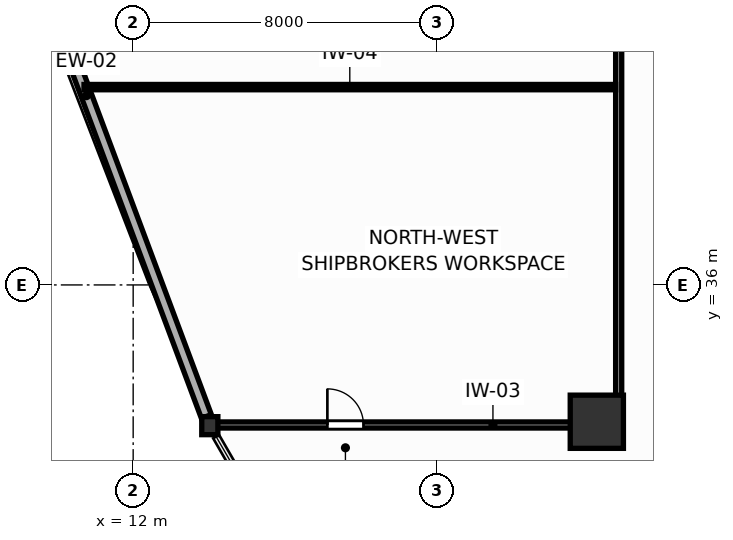
"""IFC4 building model, lengths in metres.
Left out: names, types, materials, properties, quantities, classifications, styles, units other than length and angle.
Written with IfcOpenShell. Run it as: python <this file> out.ifc"""

import sys

from ifc_helpers import new_model, si_unit, direction, frame, frame_2d, origin, origin_2d, place, context, subcontext, project, spatial, rectangle, i_section, extrude, source, transform, mapped, element, fill, save


model = new_model("IFC4")
c1 = context("Model", 3, precision=1e-05, world=origin(), true_north=direction((0.0, 1.0)))
c2 = subcontext(c1, "Body", "Model", "MODEL_VIEW")
j1 = project(units=[si_unit("LENGTHUNIT", "METRE"), si_unit("PLANEANGLEUNIT", "RADIAN")], contexts=[c1])
p1 = place(None, origin())
s1 = spatial("IfcSite", under=j1, at=p1, CompositionType="ELEMENT")
p2 = place(p1, origin())
s2 = spatial("IfcBuilding", under=s1, at=p2, CompositionType="ELEMENT")
p3 = place(p2, frame((0.0, 0.0, 51.3)))
s3 = spatial("IfcBuildingStorey", under=s2, at=p3, CompositionType="ELEMENT", Elevation=51.3)
m1 = source(origin(), c2, "Body", "SweptSolid", [
    extrude(rectangle(XDim=1.4, YDim=1.4, at=origin_2d()), origin(), (0.0, 0.0, 1.0), 3.9),
])
p4 = place(p3, frame((24.2, 32.4, 0.0), z_axis=(0.0, 0.0, 1.0), x_axis=(1.0, 0.0, 0.0)))
e1 = element("IfcColumn", 1, at=p4, inside=s3, PredefinedType="COLUMN", context=c2, shape_type="MappedRepresentation", body=[
    mapped(m1, transform((0.0, 0.0, 0.0), scale=1.0)),
])
m2 = source(origin(), c2, "Body", "SweptSolid", [
    extrude(i_section(OverallWidth=0.424, OverallDepth=0.474, WebThickness=0.045, FlangeThickness=0.072, FilletRadius=0.015, at=origin_2d()), origin(), (0.0, 0.0, 1.0), 3.9),
])
p5 = place(p3, frame((14.017, 32.297, 0.0), z_axis=(0.0, 0.0, 1.0), x_axis=(1.0, 0.0, 0.0)))
e2 = element("IfcColumn", 2, at=p5, inside=s3, PredefinedType="COLUMN", context=c2, shape_type="MappedRepresentation", body=[
    mapped(m2, transform((0.0, 0.0, 0.0), scale=1.0)),
])
p6 = place(p3, frame((7.616, 49.42, 0.0), z_axis=(0.0, 0.0, 1.0), x_axis=(0.350140465982, -0.936697205121, 0.0)))
e3 = element("IfcWall", 3, at=p6, inside=s3, PredefinedType="SOLIDWALL", context=c2, shape_type="SweptSolid", body=[
    extrude(rectangle(XDim=18.022, YDim=0.28, at=frame_2d((9.011, 0.0))), origin(), (0.0, 0.0, 1.0), 3.23),
])
p7 = place(p3, frame((24.775, 32.31, 0.0), z_axis=(0.0, 0.0, 1.0), x_axis=(0.0, 1.0, 0.0)))
e4 = element("IfcWall", 4, at=p7, inside=s3, PredefinedType="PARTITIONING", context=c2, shape_type="SweptSolid", body=[
    extrude(rectangle(XDim=23.984, YDim=0.16, at=frame_2d((11.992, 0.0))), origin(), (0.0, 0.0, 1.0), 3.68),
])
p8 = place(p7, frame((11.477, 0.0, 0.0)))
e5 = element("IfcOpeningElement", 5, at=p8, cuts=e4, PredefinedType="OPENING", context=c2, shape_type="SweptSolid", body=[
    extrude(rectangle(XDim=0.95, YDim=2.05, at=frame_2d((0.475, 1.025))), frame((0.0, 0.09, 0.0), z_axis=(0.0, -1.0, 0.0), x_axis=(1.0, 0.0, 0.0)), (0.0, 0.0, 1.0), 0.18),
])
p9 = place(p3, frame((14.03, 32.315, 0.0), z_axis=(0.0, 0.0, 1.0), x_axis=(1.0, 0.0, 0.0)))
e6 = element("IfcWall", 6, at=p9, inside=s3, PredefinedType="PARTITIONING", context=c2, shape_type="SweptSolid", body=[
    extrude(rectangle(XDim=10.663, YDim=0.16, at=frame_2d((5.332, 0.0))), origin(), (0.0, 0.0, 1.0), 3.18),
])
p10 = place(p9, frame((3.08, 0.0, 0.0)))
e7 = element("IfcOpeningElement", 7, at=p10, cuts=e6, PredefinedType="OPENING", context=c2, shape_type="SweptSolid", body=[
    extrude(rectangle(XDim=0.95, YDim=2.05, at=frame_2d((0.475, 1.025))), frame((0.0, 0.09, 0.0), z_axis=(0.0, -1.0, 0.0), x_axis=(1.0, 0.0, 0.0)), (0.0, 0.0, 1.0), 0.18),
])
p11 = place(p3, frame((10.707, 41.205, 0.0), z_axis=(0.0, 0.0, 1.0), x_axis=(1.0, 0.0, 0.0)))
e8 = element("IfcWall", 8, at=p11, inside=s3, PredefinedType="PARTITIONING", context=c2, shape_type="SweptSolid", body=[
    extrude(rectangle(XDim=13.986, YDim=0.14, at=frame_2d((6.993, 0.0))), origin(), (0.0, 0.0, 1.0), 3.68),
])
p12 = place(p10, origin())
e9 = element("IfcDoor", 9, at=p12, inside=s3, OperationType="SINGLE_SWING_LEFT", PredefinedType="DOOR", context=c2, shape_type="SweptSolid", body=[
    extrude(rectangle(XDim=0.95, YDim=2.05, at=frame_2d((0.475, 1.025))), frame((0.0, 0.025, 0.0), z_axis=(0.0, -1.0, 0.0), x_axis=(1.0, 0.0, 0.0)), (0.0, 0.0, 1.0), 0.05),
])
fill(e7, e9)
save(model, sys.argv[1])
